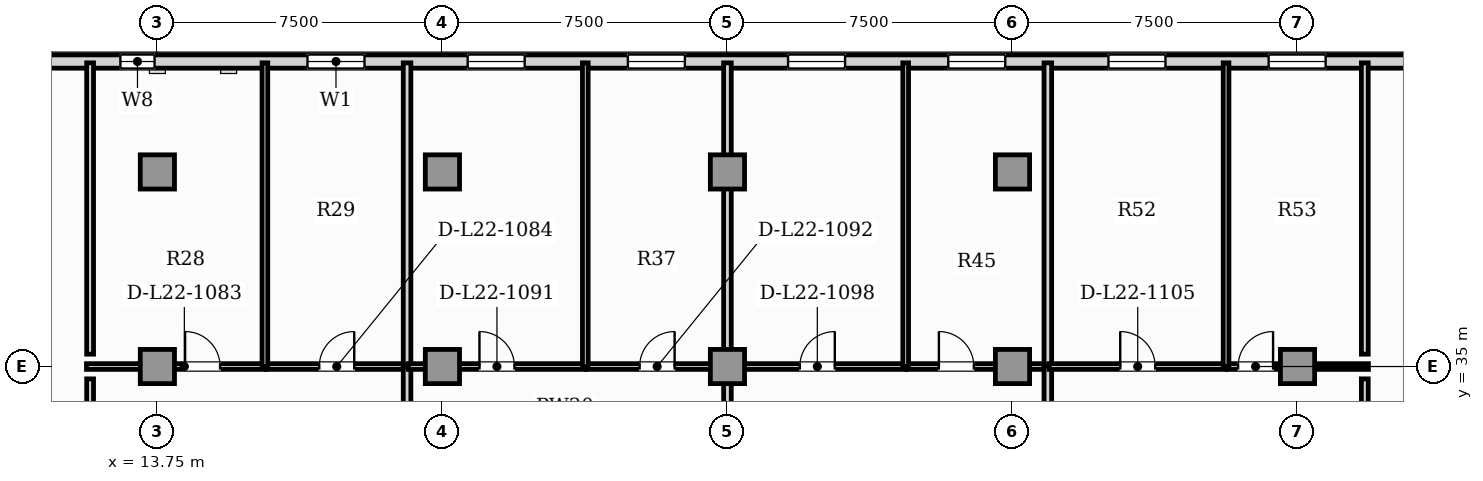
"""IFC4 building model, lengths in metres.
Left out: names, types, materials, properties, quantities, classifications, styles, units other than length and angle.
Written with IfcOpenShell. Run it as: python <this file> out.ifc"""

import sys

from ifc_helpers import new_model, si_unit, direction, frame, frame_2d, origin, origin_2d, place, context, subcontext, project, spatial, rectangle, extrude, element, fill, save


model = new_model("IFC4")
c1 = context("Model", 3, precision=1e-05, world=origin(), true_north=direction((0.0, 1.0)))
c2 = subcontext(c1, "Body", "Model", "MODEL_VIEW")
j1 = project(units=[si_unit("LENGTHUNIT", "METRE"), si_unit("PLANEANGLEUNIT", "RADIAN")], contexts=[c1])
p1 = place(None, origin())
s1 = spatial("IfcSite", under=j1, at=p1, CompositionType="ELEMENT")
p2 = place(p1, origin())
s2 = spatial("IfcBuilding", under=s1, at=p2, CompositionType="ELEMENT")
p3 = place(p2, frame((0.0, 0.0, 92.6)))
s3 = spatial("IfcBuildingStorey", under=s2, at=p3, CompositionType="ELEMENT", Elevation=92.6)
for number, where, z_axis, x_axis in (
    (1, (13.75, 40.12, 0.0), (0.0, 0.0, 1.0), (1.0, 0.0, 0.0)),
    (2, (21.25, 40.12, 0.0), (0.0, 0.0, 1.0), (1.0, 0.0, 0.0)),
    (3, (28.75, 40.12, 0.0), (0.0, 0.0, 1.0), (1.0, 0.0, 0.0)),
    (4, (36.25, 40.12, 0.0), (0.0, 0.0, 1.0), (1.0, 0.0, 0.0)),
    (5, (13.75, 35.0, 0.0), (0.0, 0.0, 1.0), (1.0, 0.0, 0.0)),
    (6, (21.25, 35.0, 0.0), (0.0, 0.0, 1.0), (1.0, 0.0, 0.0)),
    (7, (28.75, 35.0, 0.0), (0.0, 0.0, 1.0), (1.0, 0.0, 0.0)),
    (8, (36.25, 35.0, 0.0), (0.0, 0.0, 1.0), (1.0, 0.0, 0.0)),
    (9, (43.75, 35.0, 0.0), (0.0, 0.0, 1.0), (1.0, 0.0, 0.0)),
):
    element("IfcColumn", number, at=place(p3, frame(where, z_axis=z_axis, x_axis=x_axis)), inside=s3, PredefinedType="COLUMN", context=c2, shape_type="SweptSolid", body=[
        extrude(rectangle(XDim=0.9, YDim=0.9, at=origin_2d()), origin(), (0.0, 0.0, 1.0), 3.85),
    ])
p4 = place(p3, frame((51.66, 43.025, 0.0), z_axis=(0.0, 0.0, 1.0), x_axis=(-1.0, 0.0, 0.0)))
e10 = element("IfcWall", 10, at=p4, inside=s3, PredefinedType="SOLIDWALL", context=c2, shape_type="SweptSolid", body=[
    extrude(rectangle(XDim=45.82, YDim=0.35, at=frame_2d((22.91, 0.0))), origin(), (0.0, 0.0, 1.0), 3.6),
])
p5 = place(p4, frame((42.65, 0.0, 0.85)))
e11 = element("IfcOpeningElement", 11, at=p5, cuts=e10, PredefinedType="OPENING", context=c2, shape_type="SweptSolid", body=[
    extrude(rectangle(XDim=2.4, YDim=2.0, at=frame_2d((1.2, 1.0))), frame((0.0, 0.185, 0.0), z_axis=(0.0, -1.0, 0.0), x_axis=(1.0, 0.0, 0.0)), (0.0, 0.0, 1.0), 0.37),
])
p6 = place(p4, frame((37.984, 0.0, 0.9)))
e12 = element("IfcOpeningElement", 12, at=p6, cuts=e10, PredefinedType="OPENING", context=c2, shape_type="SweptSolid", body=[
    extrude(rectangle(XDim=0.9, YDim=1.4, at=frame_2d((0.45, 0.7))), frame((0.0, 0.185, 0.0), z_axis=(0.0, -1.0, 0.0), x_axis=(1.0, 0.0, 0.0)), (0.0, 0.0, 1.0), 0.37),
])
p7 = place(p4, frame((32.46, 0.0, 0.9)))
e13 = element("IfcOpeningElement", 13, at=p7, cuts=e10, PredefinedType="OPENING", context=c2, shape_type="SweptSolid", body=[
    extrude(rectangle(XDim=1.5, YDim=1.95, at=frame_2d((0.75, 0.975))), frame((0.0, 0.185, 0.0), z_axis=(0.0, -1.0, 0.0), x_axis=(1.0, 0.0, 0.0)), (0.0, 0.0, 1.0), 0.37),
])
p8 = place(p4, frame((28.245, 0.0, 0.9)))
e14 = element("IfcOpeningElement", 14, at=p8, cuts=e10, PredefinedType="OPENING", context=c2, shape_type="SweptSolid", body=[
    extrude(rectangle(XDim=1.5, YDim=1.95, at=frame_2d((0.75, 0.975))), frame((0.0, 0.185, 0.0), z_axis=(0.0, -1.0, 0.0), x_axis=(1.0, 0.0, 0.0)), (0.0, 0.0, 1.0), 0.37),
])
p9 = place(p4, frame((24.03, 0.0, 0.9)))
e15 = element("IfcOpeningElement", 15, at=p9, cuts=e10, PredefinedType="OPENING", context=c2, shape_type="SweptSolid", body=[
    extrude(rectangle(XDim=1.5, YDim=1.95, at=frame_2d((0.75, 0.975))), frame((0.0, 0.185, 0.0), z_axis=(0.0, -1.0, 0.0), x_axis=(1.0, 0.0, 0.0)), (0.0, 0.0, 1.0), 0.37),
])
p10 = place(p4, frame((19.815, 0.0, 0.9)))
e16 = element("IfcOpeningElement", 16, at=p10, cuts=e10, PredefinedType="OPENING", context=c2, shape_type="SweptSolid", body=[
    extrude(rectangle(XDim=1.5, YDim=1.95, at=frame_2d((0.75, 0.975))), frame((0.0, 0.185, 0.0), z_axis=(0.0, -1.0, 0.0), x_axis=(1.0, 0.0, 0.0)), (0.0, 0.0, 1.0), 0.37),
])
p11 = place(p4, frame((15.6, 0.0, 0.9)))
e17 = element("IfcOpeningElement", 17, at=p11, cuts=e10, PredefinedType="OPENING", context=c2, shape_type="SweptSolid", body=[
    extrude(rectangle(XDim=1.5, YDim=1.95, at=frame_2d((0.75, 0.975))), frame((0.0, 0.185, 0.0), z_axis=(0.0, -1.0, 0.0), x_axis=(1.0, 0.0, 0.0)), (0.0, 0.0, 1.0), 0.37),
])
p12 = place(p4, frame((11.385, 0.0, 0.9)))
e18 = element("IfcOpeningElement", 18, at=p12, cuts=e10, PredefinedType="OPENING", context=c2, shape_type="SweptSolid", body=[
    extrude(rectangle(XDim=1.5, YDim=1.95, at=frame_2d((0.75, 0.975))), frame((0.0, 0.185, 0.0), z_axis=(0.0, -1.0, 0.0), x_axis=(1.0, 0.0, 0.0)), (0.0, 0.0, 1.0), 0.37),
])
p13 = place(p4, frame((7.17, 0.0, 0.9)))
e19 = element("IfcOpeningElement", 19, at=p13, cuts=e10, PredefinedType="OPENING", context=c2, shape_type="SweptSolid", body=[
    extrude(rectangle(XDim=1.5, YDim=1.95, at=frame_2d((0.75, 0.975))), frame((0.0, 0.185, 0.0), z_axis=(0.0, -1.0, 0.0), x_axis=(1.0, 0.0, 0.0)), (0.0, 0.0, 1.0), 0.37),
])
p14 = place(p3, frame((11.885, 35.0, 0.0), z_axis=(0.0, 0.0, 1.0), x_axis=(1.0, 0.0, 0.0)))
e20 = element("IfcWall", 20, at=p14, inside=s3, PredefinedType="PARTITIONING", context=c2, shape_type="SweptSolid", body=[
    extrude(rectangle(XDim=4.7, YDim=0.15, at=frame_2d((2.35, 0.0))), origin(), (0.0, 0.0, 1.0), 2.983),
])
p15 = place(p14, frame((2.595, 0.0, 0.0)))
e21 = element("IfcOpeningElement", 21, at=p15, cuts=e20, PredefinedType="OPENING", context=c2, shape_type="SweptSolid", body=[
    extrude(rectangle(XDim=0.92, YDim=2.1, at=frame_2d((0.46, 1.05))), frame((0.0, 0.085, 0.0), z_axis=(0.0, -1.0, 0.0), x_axis=(1.0, 0.0, 0.0)), (0.0, 0.0, 1.0), 0.17),
])
p16 = place(p3, frame((16.615, 35.0, 0.0), z_axis=(0.0, 0.0, 1.0), x_axis=(1.0, 0.0, 0.0)))
e22 = element("IfcWall", 22, at=p16, inside=s3, PredefinedType="PARTITIONING", context=c2, shape_type="SweptSolid", body=[
    extrude(rectangle(XDim=3.71, YDim=0.15, at=frame_2d((1.855, 0.0))), origin(), (0.0, 0.0, 1.0), 2.983),
])
p17 = place(p16, frame((1.395, 0.0, 0.0)))
e23 = element("IfcOpeningElement", 23, at=p17, cuts=e22, PredefinedType="OPENING", context=c2, shape_type="SweptSolid", body=[
    extrude(rectangle(XDim=0.92, YDim=2.1, at=frame_2d((0.46, 1.05))), frame((0.0, 0.085, 0.0), z_axis=(0.0, -1.0, 0.0), x_axis=(1.0, 0.0, 0.0)), (0.0, 0.0, 1.0), 0.17),
])
p18 = place(p3, frame((20.32, 33.495, 0.0), z_axis=(0.0, 0.0, 1.0), x_axis=(0.0, 1.0, 0.0)))
e24 = element("IfcWall", 24, at=p18, inside=s3, PredefinedType="PARTITIONING", context=c2, shape_type="SweptSolid", body=[
    extrude(rectangle(XDim=1.51, YDim=0.2, at=frame_2d((0.755, 0.0))), origin(), (0.0, 0.0, 1.0), 3.6),
])
p19 = place(p3, frame((16.58, 34.995, 0.0), z_axis=(0.0, 0.0, 1.0), x_axis=(0.0, 1.0, 0.0)))
e25 = element("IfcWall", 25, at=p19, inside=s3, PredefinedType="PARTITIONING", context=c2, shape_type="SweptSolid", body=[
    extrude(rectangle(XDim=7.995, YDim=0.15, at=frame_2d((3.998, 0.0))), origin(), (0.0, 0.0, 1.0), 3.6),
])
p20 = place(p3, frame((20.32, 35.035, 0.0), z_axis=(0.0, 0.0, 1.0), x_axis=(0.0, 1.0, 0.0)))
e26 = element("IfcWall", 26, at=p20, inside=s3, PredefinedType="PARTITIONING", context=c2, shape_type="SweptSolid", body=[
    extrude(rectangle(XDim=7.955, YDim=0.2, at=frame_2d((3.978, 0.0))), origin(), (0.0, 0.0, 1.0), 3.6),
])
p21 = place(p3, frame((20.355, 35.0, 0.0), z_axis=(0.0, 0.0, 1.0), x_axis=(1.0, 0.0, 0.0)))
e27 = element("IfcWall", 27, at=p21, inside=s3, PredefinedType="PARTITIONING", context=c2, shape_type="SweptSolid", body=[
    extrude(rectangle(XDim=4.66, YDim=0.15, at=frame_2d((2.33, 0.0))), origin(), (0.0, 0.0, 1.0), 2.983),
])
p22 = place(p21, frame((1.87, 0.0, 0.0)))
e28 = element("IfcOpeningElement", 28, at=p22, cuts=e27, PredefinedType="OPENING", context=c2, shape_type="SweptSolid", body=[
    extrude(rectangle(XDim=0.92, YDim=2.1, at=frame_2d((0.46, 1.05))), frame((0.0, 0.085, 0.0), z_axis=(0.0, -1.0, 0.0), x_axis=(1.0, 0.0, 0.0)), (0.0, 0.0, 1.0), 0.17),
])
p23 = place(p3, frame((25.045, 35.0, 0.0), z_axis=(0.0, 0.0, 1.0), x_axis=(1.0, 0.0, 0.0)))
e29 = element("IfcWall", 29, at=p23, inside=s3, PredefinedType="PARTITIONING", context=c2, shape_type="SweptSolid", body=[
    extrude(rectangle(XDim=3.71, YDim=0.15, at=frame_2d((1.855, 0.0))), origin(), (0.0, 0.0, 1.0), 2.983),
])
p24 = place(p23, frame((1.395, 0.0, 0.0)))
e30 = element("IfcOpeningElement", 30, at=p24, cuts=e29, PredefinedType="OPENING", context=c2, shape_type="SweptSolid", body=[
    extrude(rectangle(XDim=0.92, YDim=2.1, at=frame_2d((0.46, 1.05))), frame((0.0, 0.085, 0.0), z_axis=(0.0, -1.0, 0.0), x_axis=(1.0, 0.0, 0.0)), (0.0, 0.0, 1.0), 0.17),
])
p25 = place(p3, frame((28.75, 33.495, 0.0), z_axis=(0.0, 0.0, 1.0), x_axis=(0.0, 1.0, 0.0)))
e31 = element("IfcWall", 31, at=p25, inside=s3, PredefinedType="PARTITIONING", context=c2, shape_type="SweptSolid", body=[
    extrude(rectangle(XDim=1.51, YDim=0.2, at=frame_2d((0.755, 0.0))), origin(), (0.0, 0.0, 1.0), 3.146),
])
p26 = place(p3, frame((25.01, 34.995, 0.0), z_axis=(0.0, 0.0, 1.0), x_axis=(0.0, 1.0, 0.0)))
e32 = element("IfcWall", 32, at=p26, inside=s3, PredefinedType="PARTITIONING", context=c2, shape_type="SweptSolid", body=[
    extrude(rectangle(XDim=7.995, YDim=0.15, at=frame_2d((3.998, 0.0))), origin(), (0.0, 0.0, 1.0), 3.6),
])
p27 = place(p3, frame((28.75, 35.035, 0.0), z_axis=(0.0, 0.0, 1.0), x_axis=(0.0, 1.0, 0.0)))
e33 = element("IfcWall", 33, at=p27, inside=s3, PredefinedType="PARTITIONING", context=c2, shape_type="SweptSolid", body=[
    extrude(rectangle(XDim=7.955, YDim=0.2, at=frame_2d((3.978, 0.0))), origin(), (0.0, 0.0, 1.0), 3.6),
])
p28 = place(p3, frame((28.785, 35.0, 0.0), z_axis=(0.0, 0.0, 1.0), x_axis=(1.0, 0.0, 0.0)))
e34 = element("IfcWall", 34, at=p28, inside=s3, PredefinedType="PARTITIONING", context=c2, shape_type="SweptSolid", body=[
    extrude(rectangle(XDim=4.66, YDim=0.15, at=frame_2d((2.33, 0.0))), origin(), (0.0, 0.0, 1.0), 2.983),
])
p29 = place(p28, frame((1.87, 0.0, 0.0)))
e35 = element("IfcOpeningElement", 35, at=p29, cuts=e34, PredefinedType="OPENING", context=c2, shape_type="SweptSolid", body=[
    extrude(rectangle(XDim=0.92, YDim=2.1, at=frame_2d((0.46, 1.05))), frame((0.0, 0.085, 0.0), z_axis=(0.0, -1.0, 0.0), x_axis=(1.0, 0.0, 0.0)), (0.0, 0.0, 1.0), 0.17),
])
p30 = place(p3, frame((33.475, 35.0, 0.0), z_axis=(0.0, 0.0, 1.0), x_axis=(1.0, 0.0, 0.0)))
e36 = element("IfcWall", 36, at=p30, inside=s3, PredefinedType="PARTITIONING", context=c2, shape_type="SweptSolid", body=[
    extrude(rectangle(XDim=3.71, YDim=0.15, at=frame_2d((1.855, 0.0))), origin(), (0.0, 0.0, 1.0), 2.983),
])
p31 = place(p30, frame((0.839, 0.0, 0.0)))
e37 = element("IfcOpeningElement", 37, at=p31, cuts=e36, PredefinedType="OPENING", context=c2, shape_type="SweptSolid", body=[
    extrude(rectangle(XDim=0.92, YDim=2.1, at=frame_2d((0.46, 1.05))), frame((0.0, 0.085, 0.0), z_axis=(0.0, -1.0, 0.0), x_axis=(1.0, 0.0, 0.0)), (0.0, 0.0, 1.0), 0.17),
])
p32 = place(p3, frame((37.18, 33.495, 0.0), z_axis=(0.0, 0.0, 1.0), x_axis=(0.0, 1.0, 0.0)))
e38 = element("IfcWall", 38, at=p32, inside=s3, PredefinedType="PARTITIONING", context=c2, shape_type="SweptSolid", body=[
    extrude(rectangle(XDim=1.51, YDim=0.2, at=frame_2d((0.755, 0.0))), origin(), (0.0, 0.0, 1.0), 3.6),
])
p33 = place(p3, frame((33.44, 34.995, 0.0), z_axis=(0.0, 0.0, 1.0), x_axis=(0.0, 1.0, 0.0)))
e39 = element("IfcWall", 39, at=p33, inside=s3, PredefinedType="PARTITIONING", context=c2, shape_type="SweptSolid", body=[
    extrude(rectangle(XDim=7.995, YDim=0.15, at=frame_2d((3.998, 0.0))), origin(), (0.0, 0.0, 1.0), 3.6),
])
p34 = place(p3, frame((37.18, 35.035, 0.0), z_axis=(0.0, 0.0, 1.0), x_axis=(0.0, 1.0, 0.0)))
e40 = element("IfcWall", 40, at=p34, inside=s3, PredefinedType="PARTITIONING", context=c2, shape_type="SweptSolid", body=[
    extrude(rectangle(XDim=7.955, YDim=0.2, at=frame_2d((3.978, 0.0))), origin(), (0.0, 0.0, 1.0), 3.6),
])
p35 = place(p3, frame((37.215, 35.0, 0.0), z_axis=(0.0, 0.0, 1.0), x_axis=(1.0, 0.0, 0.0)))
e41 = element("IfcWall", 41, at=p35, inside=s3, PredefinedType="PARTITIONING", context=c2, shape_type="SweptSolid", body=[
    extrude(rectangle(XDim=4.66, YDim=0.15, at=frame_2d((2.33, 0.0))), origin(), (0.0, 0.0, 1.0), 2.983),
])
p36 = place(p35, frame((1.87, 0.0, 0.0)))
e42 = element("IfcOpeningElement", 42, at=p36, cuts=e41, PredefinedType="OPENING", context=c2, shape_type="SweptSolid", body=[
    extrude(rectangle(XDim=0.92, YDim=2.1, at=frame_2d((0.46, 1.05))), frame((0.0, 0.085, 0.0), z_axis=(0.0, -1.0, 0.0), x_axis=(1.0, 0.0, 0.0)), (0.0, 0.0, 1.0), 0.17),
])
p37 = place(p3, frame((41.905, 35.0, 0.0), z_axis=(0.0, 0.0, 1.0), x_axis=(1.0, 0.0, 0.0)))
e43 = element("IfcWall", 43, at=p37, inside=s3, PredefinedType="PARTITIONING", context=c2, shape_type="SweptSolid", body=[
    extrude(rectangle(XDim=3.71, YDim=0.15, at=frame_2d((1.855, 0.0))), origin(), (0.0, 0.0, 1.0), 2.983),
])
p38 = place(p37, frame((0.282, 0.0, 0.0)))
e44 = element("IfcOpeningElement", 44, at=p38, cuts=e43, PredefinedType="OPENING", context=c2, shape_type="SweptSolid", body=[
    extrude(rectangle(XDim=0.92, YDim=2.1, at=frame_2d((0.46, 1.05))), frame((0.0, 0.085, 0.0), z_axis=(0.0, -1.0, 0.0), x_axis=(1.0, 0.0, 0.0)), (0.0, 0.0, 1.0), 0.17),
])
p39 = place(p3, frame((41.87, 34.995, 0.0), z_axis=(0.0, 0.0, 1.0), x_axis=(0.0, 1.0, 0.0)))
e45 = element("IfcWall", 45, at=p39, inside=s3, PredefinedType="PARTITIONING", context=c2, shape_type="SweptSolid", body=[
    extrude(rectangle(XDim=7.995, YDim=0.15, at=frame_2d((3.998, 0.0))), origin(), (0.0, 0.0, 1.0), 3.6),
])
p40 = place(p3, frame((11.98, 33.825, 0.0), z_axis=(0.0, 0.0, 1.0), x_axis=(0.0, 1.0, 0.0)))
e46 = element("IfcWall", 46, at=p40, inside=s3, PredefinedType="PARTITIONING", context=c2, shape_type="SweptSolid", body=[
    extrude(rectangle(XDim=0.85, YDim=0.18, at=frame_2d((0.425, 0.0))), origin(), (0.0, 0.0, 1.0), 3.6),
])
p41 = place(p3, frame((11.98, 35.325, 0.0), z_axis=(0.0, 0.0, 1.0), x_axis=(0.0, 1.0, 0.0)))
e47 = element("IfcWall", 47, at=p41, inside=s3, PredefinedType="PARTITIONING", context=c2, shape_type="SweptSolid", body=[
    extrude(rectangle(XDim=7.665, YDim=0.18, at=frame_2d((3.833, 0.0))), origin(), (0.0, 0.0, 1.0), 3.6),
])
p42 = place(p3, frame((45.52, 34.675, 0.0), z_axis=(0.0, 0.0, 1.0), x_axis=(0.0, -1.0, 0.0)))
e48 = element("IfcWall", 48, at=p42, inside=s3, PredefinedType="PARTITIONING", context=c2, shape_type="SweptSolid", body=[
    extrude(rectangle(XDim=0.85, YDim=0.18, at=frame_2d((0.425, 0.0))), origin(), (0.0, 0.0, 1.0), 3.6),
])
p43 = place(p3, frame((45.52, 42.99, 0.0), z_axis=(0.0, 0.0, 1.0), x_axis=(0.0, -1.0, 0.0)))
e49 = element("IfcWall", 49, at=p43, inside=s3, PredefinedType="PARTITIONING", context=c2, shape_type="SweptSolid", body=[
    extrude(rectangle(XDim=7.665, YDim=0.18, at=frame_2d((3.833, 0.0))), origin(), (0.0, 0.0, 1.0), 3.6),
])
p44 = place(p6, origin())
e50 = element("IfcWindow", 50, at=p44, inside=s3, PartitioningType="SINGLE_PANEL", PredefinedType="WINDOW", context=c2, shape_type="SweptSolid", body=[
    extrude(rectangle(XDim=0.9, YDim=1.4, at=frame_2d((0.45, 0.7))), frame((0.0, 0.03, 0.0), z_axis=(0.0, -1.0, 0.0), x_axis=(1.0, 0.0, 0.0)), (0.0, 0.0, 1.0), 0.06),
])
fill(e12, e50)
p45 = place(p7, origin())
e51 = element("IfcWindow", 51, at=p45, inside=s3, PartitioningType="SINGLE_PANEL", PredefinedType="WINDOW", context=c2, shape_type="SweptSolid", body=[
    extrude(rectangle(XDim=1.5, YDim=1.95, at=frame_2d((0.75, 0.975))), frame((0.0, 0.03, 0.0), z_axis=(0.0, -1.0, 0.0), x_axis=(1.0, 0.0, 0.0)), (0.0, 0.0, 1.0), 0.06),
])
fill(e13, e51)
p46 = place(p8, origin())
e52 = element("IfcWindow", 52, at=p46, inside=s3, PartitioningType="SINGLE_PANEL", PredefinedType="WINDOW", context=c2, shape_type="SweptSolid", body=[
    extrude(rectangle(XDim=1.5, YDim=1.95, at=frame_2d((0.75, 0.975))), frame((0.0, 0.03, 0.0), z_axis=(0.0, -1.0, 0.0), x_axis=(1.0, 0.0, 0.0)), (0.0, 0.0, 1.0), 0.06),
])
fill(e14, e52)
p47 = place(p9, origin())
e53 = element("IfcWindow", 53, at=p47, inside=s3, PartitioningType="SINGLE_PANEL", PredefinedType="WINDOW", context=c2, shape_type="SweptSolid", body=[
    extrude(rectangle(XDim=1.5, YDim=1.95, at=frame_2d((0.75, 0.975))), frame((0.0, 0.03, 0.0), z_axis=(0.0, -1.0, 0.0), x_axis=(1.0, 0.0, 0.0)), (0.0, 0.0, 1.0), 0.06),
])
fill(e15, e53)
p48 = place(p10, origin())
e54 = element("IfcWindow", 54, at=p48, inside=s3, PartitioningType="SINGLE_PANEL", PredefinedType="WINDOW", context=c2, shape_type="SweptSolid", body=[
    extrude(rectangle(XDim=1.5, YDim=1.95, at=frame_2d((0.75, 0.975))), frame((0.0, 0.03, 0.0), z_axis=(0.0, -1.0, 0.0), x_axis=(1.0, 0.0, 0.0)), (0.0, 0.0, 1.0), 0.06),
])
fill(e16, e54)
p49 = place(p11, origin())
e55 = element("IfcWindow", 55, at=p49, inside=s3, PartitioningType="SINGLE_PANEL", PredefinedType="WINDOW", context=c2, shape_type="SweptSolid", body=[
    extrude(rectangle(XDim=1.5, YDim=1.95, at=frame_2d((0.75, 0.975))), frame((0.0, 0.03, 0.0), z_axis=(0.0, -1.0, 0.0), x_axis=(1.0, 0.0, 0.0)), (0.0, 0.0, 1.0), 0.06),
])
fill(e17, e55)
p50 = place(p12, origin())
e56 = element("IfcWindow", 56, at=p50, inside=s3, PartitioningType="SINGLE_PANEL", PredefinedType="WINDOW", context=c2, shape_type="SweptSolid", body=[
    extrude(rectangle(XDim=1.5, YDim=1.95, at=frame_2d((0.75, 0.975))), frame((0.0, 0.03, 0.0), z_axis=(0.0, -1.0, 0.0), x_axis=(1.0, 0.0, 0.0)), (0.0, 0.0, 1.0), 0.06),
])
fill(e18, e56)
p51 = place(p13, origin())
e57 = element("IfcWindow", 57, at=p51, inside=s3, PartitioningType="SINGLE_PANEL", PredefinedType="WINDOW", context=c2, shape_type="SweptSolid", body=[
    extrude(rectangle(XDim=1.5, YDim=1.95, at=frame_2d((0.75, 0.975))), frame((0.0, 0.03, 0.0), z_axis=(0.0, -1.0, 0.0), x_axis=(1.0, 0.0, 0.0)), (0.0, 0.0, 1.0), 0.06),
])
fill(e19, e57)
p52 = place(p15, origin())
e58 = element("IfcDoor", 58, at=p52, inside=s3, OperationType="SINGLE_SWING_LEFT", PredefinedType="DOOR", context=c2, shape_type="SweptSolid", body=[
    extrude(rectangle(XDim=0.92, YDim=2.1, at=frame_2d((0.46, 1.05))), frame((0.0, 0.025, 0.0), z_axis=(0.0, -1.0, 0.0), x_axis=(1.0, 0.0, 0.0)), (0.0, 0.0, 1.0), 0.05),
])
fill(e21, e58)
p53 = place(p17, origin())
e59 = element("IfcDoor", 59, at=p53, inside=s3, OperationType="SINGLE_SWING_RIGHT", PredefinedType="DOOR", context=c2, shape_type="SweptSolid", body=[
    extrude(rectangle(XDim=0.92, YDim=2.1, at=frame_2d((0.46, 1.05))), frame((0.0, 0.025, 0.0), z_axis=(0.0, -1.0, 0.0), x_axis=(1.0, 0.0, 0.0)), (0.0, 0.0, 1.0), 0.05),
])
fill(e23, e59)
p54 = place(p22, origin())
e60 = element("IfcDoor", 60, at=p54, inside=s3, OperationType="SINGLE_SWING_LEFT", PredefinedType="DOOR", context=c2, shape_type="SweptSolid", body=[
    extrude(rectangle(XDim=0.92, YDim=2.1, at=frame_2d((0.46, 1.05))), frame((0.0, 0.025, 0.0), z_axis=(0.0, -1.0, 0.0), x_axis=(1.0, 0.0, 0.0)), (0.0, 0.0, 1.0), 0.05),
])
fill(e28, e60)
p55 = place(p24, origin())
e61 = element("IfcDoor", 61, at=p55, inside=s3, OperationType="SINGLE_SWING_RIGHT", PredefinedType="DOOR", context=c2, shape_type="SweptSolid", body=[
    extrude(rectangle(XDim=0.92, YDim=2.1, at=frame_2d((0.46, 1.05))), frame((0.0, 0.025, 0.0), z_axis=(0.0, -1.0, 0.0), x_axis=(1.0, 0.0, 0.0)), (0.0, 0.0, 1.0), 0.05),
])
fill(e30, e61)
p56 = place(p29, origin())
e62 = element("IfcDoor", 62, at=p56, inside=s3, OperationType="SINGLE_SWING_RIGHT", PredefinedType="DOOR", context=c2, shape_type="SweptSolid", body=[
    extrude(rectangle(XDim=0.92, YDim=2.1, at=frame_2d((0.46, 1.05))), frame((0.0, 0.025, 0.0), z_axis=(0.0, -1.0, 0.0), x_axis=(1.0, 0.0, 0.0)), (0.0, 0.0, 1.0), 0.05),
])
fill(e35, e62)
p57 = place(p31, origin())
e63 = element("IfcDoor", 63, at=p57, inside=s3, OperationType="SINGLE_SWING_LEFT", PredefinedType="DOOR", context=c2, shape_type="SweptSolid", body=[
    extrude(rectangle(XDim=0.92, YDim=2.1, at=frame_2d((0.46, 1.05))), frame((0.0, 0.025, 0.0), z_axis=(0.0, -1.0, 0.0), x_axis=(1.0, 0.0, 0.0)), (0.0, 0.0, 1.0), 0.05),
])
fill(e37, e63)
p58 = place(p36, origin())
e64 = element("IfcDoor", 64, at=p58, inside=s3, OperationType="SINGLE_SWING_LEFT", PredefinedType="DOOR", context=c2, shape_type="SweptSolid", body=[
    extrude(rectangle(XDim=0.92, YDim=2.1, at=frame_2d((0.46, 1.05))), frame((0.0, 0.025, 0.0), z_axis=(0.0, -1.0, 0.0), x_axis=(1.0, 0.0, 0.0)), (0.0, 0.0, 1.0), 0.05),
])
fill(e42, e64)
p59 = place(p38, origin())
e65 = element("IfcDoor", 65, at=p59, inside=s3, OperationType="SINGLE_SWING_RIGHT", PredefinedType="DOOR", context=c2, shape_type="SweptSolid", body=[
    extrude(rectangle(XDim=0.92, YDim=2.1, at=frame_2d((0.46, 1.05))), frame((0.0, 0.025, 0.0), z_axis=(0.0, -1.0, 0.0), x_axis=(1.0, 0.0, 0.0)), (0.0, 0.0, 1.0), 0.05),
])
fill(e44, e65)
save(model, sys.argv[1])
